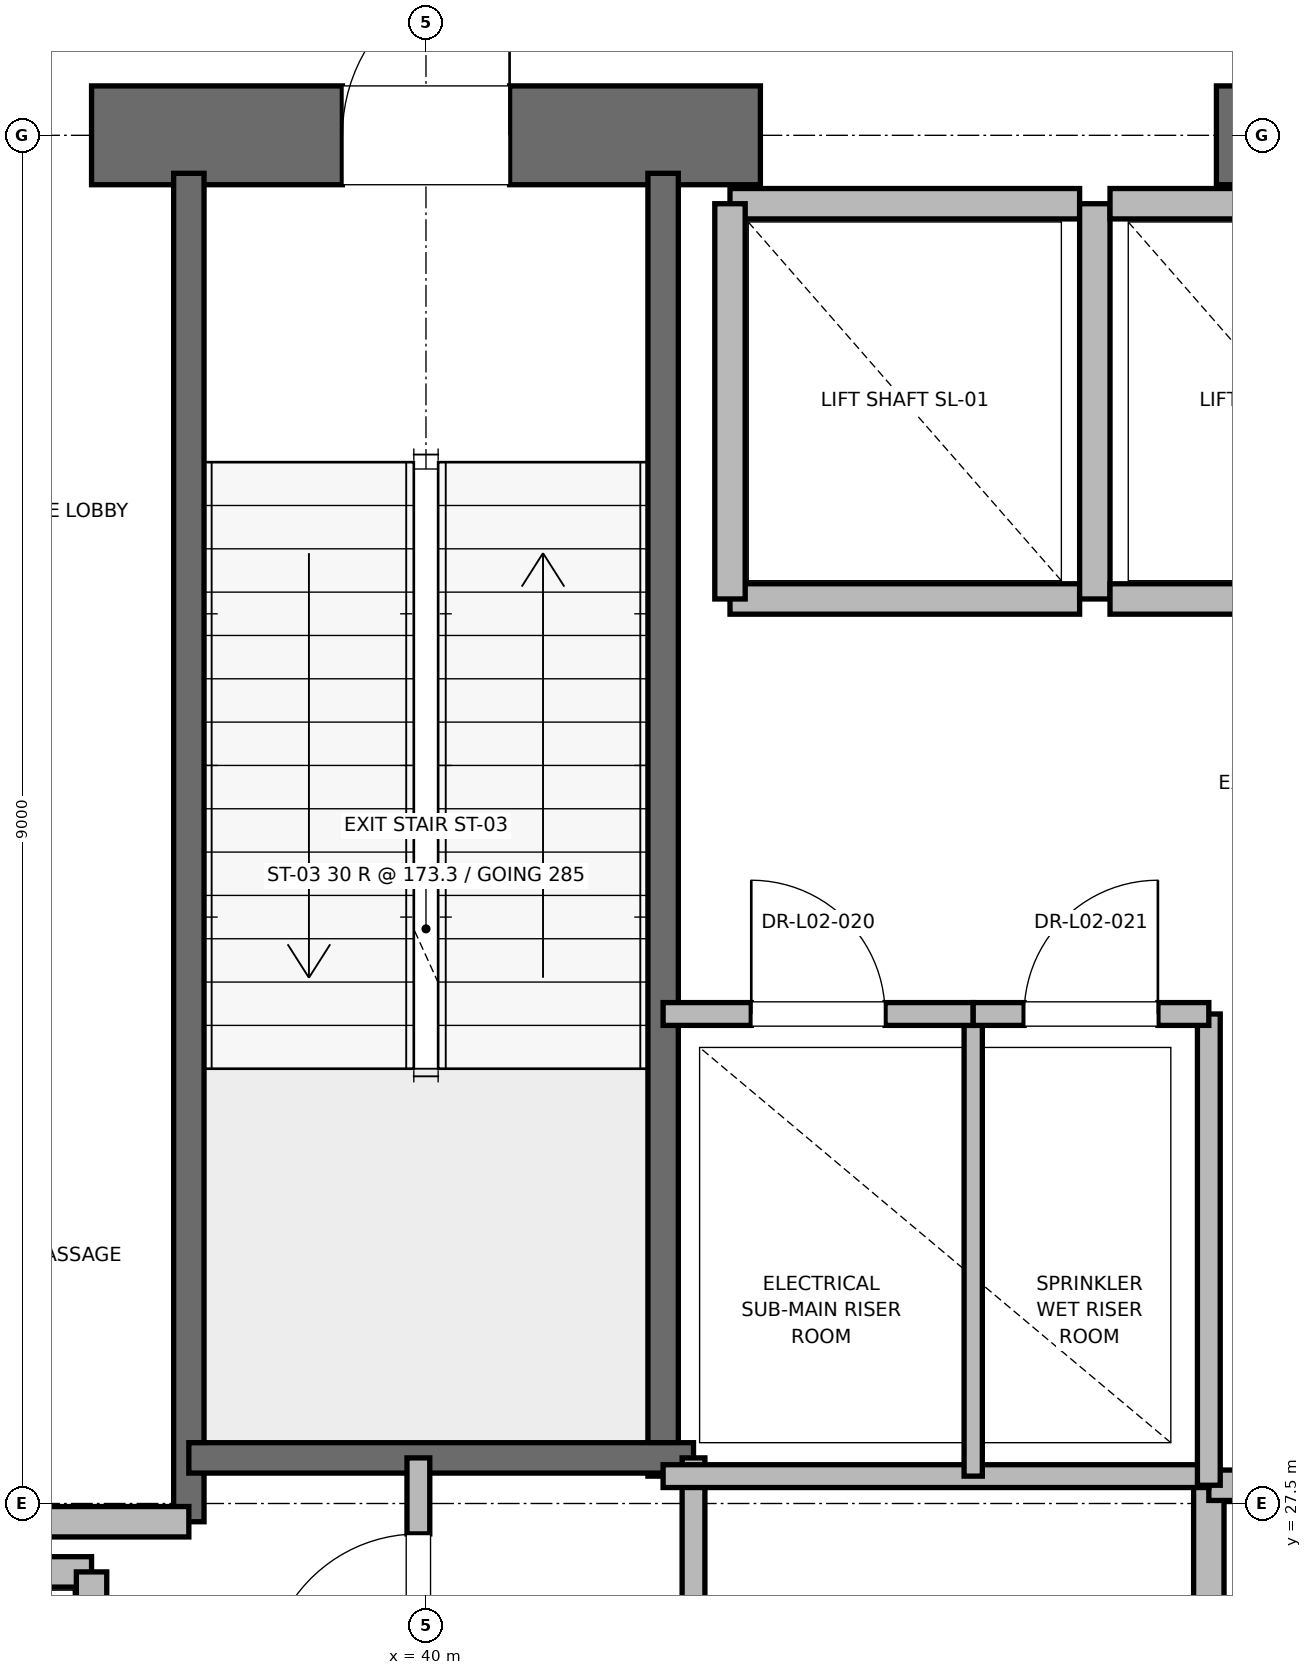
"""IFC4 building model, lengths in metres.
Left out: names, types, materials, properties, quantities, classifications, styles, units other than length and angle.
Written with IfcOpenShell. Run it as: python <this file> out.ifc"""

import sys

from ifc_helpers import new_model, si_unit, direction, frame, frame_2d, origin, place, context, subcontext, project, spatial, rectangle, extrude, element, fill, save


model = new_model("IFC4")
c1 = context("Model", 3, precision=1e-05, world=origin(), true_north=direction((0.0, 1.0)))
c2 = subcontext(c1, "Body", "Model", "MODEL_VIEW")
j1 = project(units=[si_unit("LENGTHUNIT", "METRE"), si_unit("PLANEANGLEUNIT", "RADIAN")], contexts=[c1])
p1 = place(None, origin())
s1 = spatial("IfcSite", under=j1, at=p1, CompositionType="ELEMENT")
p2 = place(p1, origin())
s2 = spatial("IfcBuilding", under=s1, at=p2, CompositionType="ELEMENT")
p3 = place(p2, frame((0.0, 0.0, 11.2)))
s3 = spatial("IfcBuildingStorey", under=s2, at=p3, CompositionType="ELEMENT", Elevation=11.2)
p4 = place(p3, frame((37.8, 36.5, 0.0), z_axis=(0.0, 0.0, 1.0), x_axis=(1.0, 0.0, 0.0)))
e1 = element("IfcWall", 1, at=p4, inside=s3, PredefinedType="SHEAR", context=c2, shape_type="SweptSolid", body=[
    extrude(rectangle(XDim=4.4, YDim=0.65, at=frame_2d((2.2, 0.0))), origin(), (0.0, 0.0, 1.0), 4.92),
])
p5 = place(p4, frame((1.65, 0.0, 0.0)))
e2 = element("IfcOpeningElement", 2, at=p5, cuts=e1, PredefinedType="OPENING", context=c2, shape_type="SweptSolid", body=[
    extrude(rectangle(XDim=1.1, YDim=2.15, at=frame_2d((0.55, 1.075))), frame((0.0, 0.325, 0.0), z_axis=(0.0, -1.0, 0.0), x_axis=(1.0, 0.0, 0.0)), (0.0, 0.0, 1.0), 0.65),
])
p6 = place(p3, frame((45.2, 36.5, 0.0), z_axis=(0.0, 0.0, 1.0), x_axis=(1.0, 0.0, 0.0)))
e3 = element("IfcWall", 3, at=p6, inside=s3, PredefinedType="SHEAR", context=c2, shape_type="SweptSolid", body=[
    extrude(rectangle(XDim=5.8, YDim=0.65, at=frame_2d((2.9, 0.0))), origin(), (0.0, 0.0, 1.0), 4.92),
])
p7 = place(p3, frame((38.44, 27.38, 0.0), z_axis=(0.0, 0.0, 1.0), x_axis=(0.0, 1.0, 0.0)))
e4 = element("IfcWall", 4, at=p7, inside=s3, PredefinedType="SOLIDWALL", context=c2, shape_type="SweptSolid", body=[
    extrude(rectangle(XDim=8.87, YDim=0.2, at=frame_2d((4.435, 0.0))), origin(), (0.0, 0.0, 1.0), 4.92),
])
p8 = place(p3, frame((41.56, 27.68, 0.0), z_axis=(0.0, 0.0, 1.0), x_axis=(0.0, 1.0, 0.0)))
e5 = element("IfcWall", 5, at=p8, inside=s3, PredefinedType="SOLIDWALL", context=c2, shape_type="SweptSolid", body=[
    extrude(rectangle(XDim=8.57, YDim=0.2, at=frame_2d((4.285, 0.0))), origin(), (0.0, 0.0, 1.0), 4.92),
])
p9 = place(p3, frame((38.44, 27.8, 0.0), z_axis=(0.0, 0.0, 1.0), x_axis=(1.0, 0.0, 0.0)))
e6 = element("IfcWall", 6, at=p9, inside=s3, PredefinedType="SOLIDWALL", context=c2, shape_type="SweptSolid", body=[
    extrude(rectangle(XDim=3.32, YDim=0.2, at=frame_2d((1.66, 0.0))), origin(), (0.0, 0.0, 1.0), 4.92),
])
p10 = place(p3, frame((32.82, 27.38, 0.0), z_axis=(0.0, 0.0, 1.0), x_axis=(1.0, 0.0, 0.0)))
e7 = element("IfcWall", 7, at=p10, inside=s3, PredefinedType="PARTITIONING", context=c2, shape_type="SweptSolid", body=[
    extrude(rectangle(XDim=5.62, YDim=0.2, at=frame_2d((2.81, 0.0))), origin(), (0.0, 0.0, 1.0), 4.92),
])
p11 = place(p3, frame((45.15, 24.25, 0.0), z_axis=(0.0, 0.0, 1.0), x_axis=(0.0, 1.0, 0.0)))
e8 = element("IfcWall", 8, at=p11, inside=s3, PredefinedType="PARTITIONING", context=c2, shape_type="SweptSolid", body=[
    extrude(rectangle(XDim=3.37, YDim=0.2, at=frame_2d((1.685, 0.0))), origin(), (0.0, 0.0, 1.0), 4.92),
])
p12 = place(p3, frame((45.15, 27.62, 0.0), z_axis=(0.0, 0.0, 1.0), x_axis=(1.0, 0.0, 0.0)))
e9 = element("IfcWall", 9, at=p12, inside=s3, PredefinedType="PARTITIONING", context=c2, shape_type="SweptSolid", body=[
    extrude(rectangle(XDim=2.03, YDim=0.2, at=frame_2d((1.015, 0.0))), origin(), (0.0, 0.0, 1.0), 4.92),
])
p13 = place(p12, frame((0.44, 0.0, 0.0)))
e10 = element("IfcOpeningElement", 10, at=p13, cuts=e9, PredefinedType="OPENING", context=c2, shape_type="SweptSolid", body=[
    extrude(rectangle(XDim=1.15, YDim=2.2, at=frame_2d((0.575, 1.1))), frame((0.0, 0.1, 0.0), z_axis=(0.0, -1.0, 0.0), x_axis=(1.0, 0.0, 0.0)), (0.0, 0.0, 1.0), 0.2),
])
p14 = place(p3, frame((37.8, 27.05, 0.0), z_axis=(0.0, 0.0, 1.0), x_axis=(-1.0, 0.0, 0.0)))
e11 = element("IfcWall", 11, at=p14, inside=s3, PredefinedType="SOLIDWALL", context=c2, shape_type="SweptSolid", body=[
    extrude(rectangle(XDim=2.3, YDim=0.2, at=frame_2d((1.15, 0.0))), origin(), (0.0, 0.0, 1.0), 4.92),
])
p15 = place(p3, frame((37.8, 24.45, 0.0), z_axis=(0.0, 0.0, 1.0), x_axis=(0.0, 1.0, 0.0)))
e12 = element("IfcWall", 12, at=p15, inside=s3, PredefinedType="SOLIDWALL", context=c2, shape_type="SweptSolid", body=[
    extrude(rectangle(XDim=2.6, YDim=0.2, at=frame_2d((1.3, 0.0))), origin(), (0.0, 0.0, 1.0), 4.92),
])
p16 = place(p3, frame((42.0, 33.45, 0.0), z_axis=(0.0, 0.0, 1.0), x_axis=(1.0, 0.0, 0.0)))
e13 = element("IfcWall", 13, at=p16, inside=s3, PredefinedType="SOLIDWALL", context=c2, shape_type="SweptSolid", body=[
    extrude(rectangle(XDim=2.3, YDim=0.2, at=frame_2d((1.15, 0.0))), origin(), (0.0, 0.0, 1.0), 4.92),
])
p17 = place(p3, frame((44.3, 36.05, 0.0), z_axis=(0.0, 0.0, 1.0), x_axis=(-1.0, 0.0, 0.0)))
e14 = element("IfcWall", 14, at=p17, inside=s3, PredefinedType="SOLIDWALL", context=c2, shape_type="SweptSolid", body=[
    extrude(rectangle(XDim=2.3, YDim=0.2, at=frame_2d((1.15, 0.0))), origin(), (0.0, 0.0, 1.0), 3.7),
])
for number, where, z_axis, x_axis in (
    (15, (42.0, 36.05, 0.0), (0.0, 0.0, 1.0), (0.0, -1.0, 0.0)),
    (16, (44.4, 33.45, 0.0), (0.0, 0.0, 1.0), (0.0, 1.0, 0.0)),
):
    element("IfcWall", number, at=place(p3, frame(where, z_axis=z_axis, x_axis=x_axis)), inside=s3, PredefinedType="SOLIDWALL", context=c2, shape_type="SweptSolid", body=[
        extrude(rectangle(XDim=2.6, YDim=0.2, at=frame_2d((1.3, 0.0))), origin(), (0.0, 0.0, 1.0), 3.7),
    ])
p18 = place(p3, frame((44.5, 33.45, 0.0), z_axis=(0.0, 0.0, 1.0), x_axis=(1.0, 0.0, 0.0)))
e17 = element("IfcWall", 17, at=p18, inside=s3, PredefinedType="SOLIDWALL", context=c2, shape_type="SweptSolid", body=[
    extrude(rectangle(XDim=2.3, YDim=0.2, at=frame_2d((1.15, 0.0))), origin(), (0.0, 0.0, 1.0), 4.92),
])
p19 = place(p3, frame((46.8, 36.05, 0.0), z_axis=(0.0, 0.0, 1.0), x_axis=(-1.0, 0.0, 0.0)))
e18 = element("IfcWall", 18, at=p19, inside=s3, PredefinedType="SOLIDWALL", context=c2, shape_type="SweptSolid", body=[
    extrude(rectangle(XDim=2.3, YDim=0.2, at=frame_2d((1.15, 0.0))), origin(), (0.0, 0.0, 1.0), 3.7),
])
p20 = place(p3, frame((41.76, 23.8, 0.0), z_axis=(0.0, 0.0, 1.0), x_axis=(0.0, 1.0, 0.0)))
e19 = element("IfcWall", 19, at=p20, inside=s3, PredefinedType="PARTITIONING", context=c2, shape_type="SweptSolid", body=[
    extrude(rectangle(XDim=4.0, YDim=0.15, at=frame_2d((2.0, 0.0))), origin(), (0.0, 0.0, 1.0), 2.85),
])
p21 = place(p3, frame((39.95, 25.8, 0.0), z_axis=(0.0, 0.0, 1.0), x_axis=(0.0, 1.0, 0.0)))
e20 = element("IfcWall", 20, at=p21, inside=s3, PredefinedType="PARTITIONING", context=c2, shape_type="SweptSolid", body=[
    extrude(rectangle(XDim=2.0, YDim=0.15, at=frame_2d((1.0, 0.0))), origin(), (0.0, 0.0, 1.0), 2.85),
])
p22 = place(p21, frame((0.5, 0.0, 0.0)))
e21 = element("IfcOpeningElement", 21, at=p22, cuts=e20, PredefinedType="OPENING", context=c2, shape_type="SweptSolid", body=[
    extrude(rectangle(XDim=1.0, YDim=2.15, at=frame_2d((0.5, 1.075))), frame((0.0, 0.075, 0.0), z_axis=(0.0, -1.0, 0.0), x_axis=(1.0, 0.0, 0.0)), (0.0, 0.0, 1.0), 0.15),
])
p23 = place(p3, frame((41.56, 27.68, 0.0), z_axis=(0.0, 0.0, 1.0), x_axis=(1.0, 0.0, 0.0)))
e22 = element("IfcWall", 22, at=p23, inside=s3, PredefinedType="PARTITIONING", context=c2, shape_type="SweptSolid", body=[
    extrude(rectangle(XDim=3.59, YDim=0.15, at=frame_2d((1.795, 0.0))), origin(), (0.0, 0.0, 1.0), 2.85),
])
p24 = place(p3, frame((45.15, 27.62, 0.0), z_axis=(0.0, 0.0, 1.0), x_axis=(0.0, 1.0, 0.0)))
e23 = element("IfcWall", 23, at=p24, inside=s3, PredefinedType="PARTITIONING", context=c2, shape_type="SweptSolid", body=[
    extrude(rectangle(XDim=3.1, YDim=0.15, at=frame_2d((1.55, 0.0))), origin(), (0.0, 0.0, 1.0), 2.85),
])
p25 = place(p3, frame((43.6, 27.68, 0.0), z_axis=(0.0, 0.0, 1.0), x_axis=(0.0, 1.0, 0.0)))
e24 = element("IfcWall", 24, at=p25, inside=s3, PredefinedType="PARTITIONING", context=c2, shape_type="SweptSolid", body=[
    extrude(rectangle(XDim=3.04, YDim=0.12, at=frame_2d((1.52, 0.0))), origin(), (0.0, 0.0, 1.0), 2.85),
])
p26 = place(p3, frame((41.56, 30.72, 0.0), z_axis=(0.0, 0.0, 1.0), x_axis=(1.0, 0.0, 0.0)))
e25 = element("IfcWall", 25, at=p26, inside=s3, PredefinedType="PARTITIONING", context=c2, shape_type="SweptSolid", body=[
    extrude(rectangle(XDim=2.04, YDim=0.15, at=frame_2d((1.02, 0.0))), origin(), (0.0, 0.0, 1.0), 2.85),
])
p27 = place(p26, frame((0.58, 0.0, 0.0)))
e26 = element("IfcOpeningElement", 26, at=p27, cuts=e25, PredefinedType="OPENING", context=c2, shape_type="SweptSolid", body=[
    extrude(rectangle(XDim=0.88, YDim=2.1, at=frame_2d((0.44, 1.05))), frame((0.0, 0.075, 0.0), z_axis=(0.0, -1.0, 0.0), x_axis=(1.0, 0.0, 0.0)), (0.0, 0.0, 1.0), 0.15),
])
p28 = place(p3, frame((43.6, 30.72, 0.0), z_axis=(0.0, 0.0, 1.0), x_axis=(1.0, 0.0, 0.0)))
e27 = element("IfcWall", 27, at=p28, inside=s3, PredefinedType="PARTITIONING", context=c2, shape_type="SweptSolid", body=[
    extrude(rectangle(XDim=1.55, YDim=0.15, at=frame_2d((0.775, 0.0))), origin(), (0.0, 0.0, 1.0), 2.85),
])
p29 = place(p28, frame((0.335, 0.0, 0.0)))
e28 = element("IfcOpeningElement", 28, at=p29, cuts=e27, PredefinedType="OPENING", context=c2, shape_type="SweptSolid", body=[
    extrude(rectangle(XDim=0.88, YDim=2.1, at=frame_2d((0.44, 1.05))), frame((0.0, 0.075, 0.0), z_axis=(0.0, -1.0, 0.0), x_axis=(1.0, 0.0, 0.0)), (0.0, 0.0, 1.0), 0.15),
])
p30 = place(p5, origin())
e29 = element("IfcDoor", 29, at=p30, inside=s3, OperationType="SINGLE_SWING_RIGHT", PredefinedType="DOOR", context=c2, shape_type="SweptSolid", body=[
    extrude(rectangle(XDim=1.1, YDim=2.15, at=frame_2d((0.55, 1.075))), frame((0.0, 0.025, 0.0), z_axis=(0.0, -1.0, 0.0), x_axis=(1.0, 0.0, 0.0)), (0.0, 0.0, 1.0), 0.05),
])
fill(e2, e29)
p31 = place(p22, origin())
e30 = element("IfcDoor", 30, at=p31, inside=s3, OperationType="SINGLE_SWING_LEFT", PredefinedType="DOOR", context=c2, shape_type="SweptSolid", body=[
    extrude(rectangle(XDim=1.0, YDim=2.15, at=frame_2d((0.5, 1.075))), frame((0.0, 0.025, 0.0), z_axis=(0.0, -1.0, 0.0), x_axis=(1.0, 0.0, 0.0)), (0.0, 0.0, 1.0), 0.05),
])
fill(e21, e30)
p32 = place(p27, origin())
e31 = element("IfcDoor", 31, at=p32, inside=s3, OperationType="SINGLE_SWING_LEFT", PredefinedType="DOOR", context=c2, shape_type="SweptSolid", body=[
    extrude(rectangle(XDim=0.88, YDim=2.1, at=frame_2d((0.44, 1.05))), frame((0.0, 0.025, 0.0), z_axis=(0.0, -1.0, 0.0), x_axis=(1.0, 0.0, 0.0)), (0.0, 0.0, 1.0), 0.05),
])
fill(e26, e31)
p33 = place(p29, origin())
e32 = element("IfcDoor", 32, at=p33, inside=s3, OperationType="SINGLE_SWING_RIGHT", PredefinedType="DOOR", context=c2, shape_type="SweptSolid", body=[
    extrude(rectangle(XDim=0.88, YDim=2.1, at=frame_2d((0.44, 1.05))), frame((0.0, 0.025, 0.0), z_axis=(0.0, -1.0, 0.0), x_axis=(1.0, 0.0, 0.0)), (0.0, 0.0, 1.0), 0.05),
])
fill(e28, e32)
save(model, sys.argv[1])
